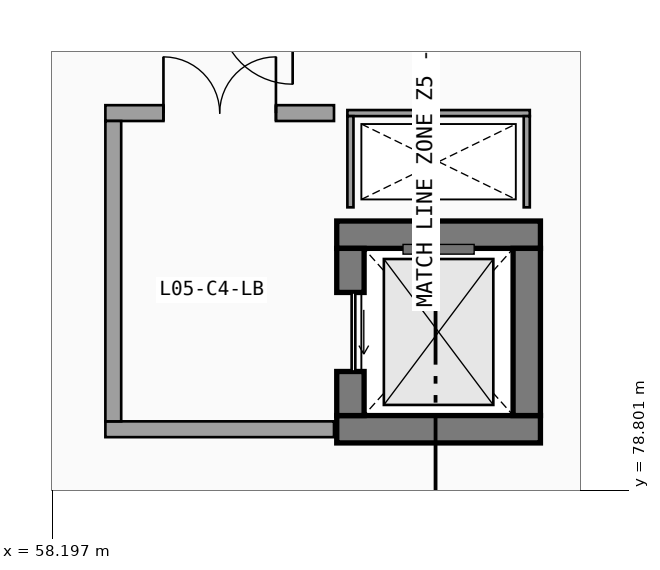
"""IFC4 building model, lengths in metres.
Left out: names, types, materials, properties, quantities, classifications, styles, units other than length and angle.
Written with IfcOpenShell. Run it as: python <this file> out.ifc"""

import sys

from ifc_helpers import new_model, si_unit, direction, frame, frame_2d, origin, place, context, subcontext, project, spatial, rectangle, extrude, element, fill, save


model = new_model("IFC4")
c1 = context("Model", 3, precision=1e-05, world=origin(), true_north=direction((0.0, 1.0)))
c2 = subcontext(c1, "Body", "Model", "MODEL_VIEW")
j1 = project(units=[si_unit("LENGTHUNIT", "METRE"), si_unit("PLANEANGLEUNIT", "RADIAN")], contexts=[c1])
p1 = place(None, origin())
s1 = spatial("IfcSite", under=j1, at=p1, CompositionType="ELEMENT")
p2 = place(p1, origin())
s2 = spatial("IfcBuilding", under=s1, at=p2, CompositionType="ELEMENT")
p3 = place(p2, frame((0.0, 0.0, 23.1)))
s3 = spatial("IfcBuildingStorey", under=s2, at=p3, CompositionType="ELEMENT", Elevation=23.1)
for number, where, z_axis, x_axis in (
    (1, (62.875, 79.8, 0.0), (0.0, 0.0, 1.0), (1.0, 0.0, 0.0)),
    (2, (66.225, 83.0, 0.0), (0.0, 0.0, 1.0), (-1.0, 0.0, 0.0)),
):
    element("IfcWall", number, at=place(p3, frame(where, z_axis=z_axis, x_axis=x_axis)), inside=s3, PredefinedType="SHEAR", context=c2, shape_type="SweptSolid", body=[
        extrude(rectangle(XDim=3.35, YDim=0.45, at=frame_2d((1.675, 0.0))), origin(), (0.0, 0.0, 1.0), 4.82),
    ])
p4 = place(p3, frame((63.1, 82.775, 0.0), z_axis=(0.0, 0.0, 1.0), x_axis=(0.0, -1.0, 0.0)))
e3 = element("IfcWall", 3, at=p4, inside=s3, PredefinedType="SHEAR", context=c2, shape_type="SweptSolid", body=[
    extrude(rectangle(XDim=2.75, YDim=0.45, at=frame_2d((1.375, 0.0))), origin(), (0.0, 0.0, 1.0), 4.82),
])
p5 = place(p4, frame((0.725, 0.0, 0.0), z_axis=(0.0, 0.0, 1.0), x_axis=(1.0, 0.0, 0.0)))
e4 = element("IfcOpeningElement", 4, at=p5, cuts=e3, PredefinedType="OPENING", context=c2, shape_type="SweptSolid", body=[
    extrude(rectangle(XDim=1.3, YDim=2.25, at=frame_2d((0.65, 1.125))), frame((0.0, 0.235, 0.0), z_axis=(0.0, -1.0, 0.0), x_axis=(1.0, 0.0, 0.0)), (0.0, 0.0, 1.0), 0.47),
])
p6 = place(p3, frame((66.0, 80.025, 0.0), z_axis=(0.0, 0.0, 1.0), x_axis=(0.0, 1.0, 0.0)))
e5 = element("IfcWall", 5, at=p6, inside=s3, PredefinedType="SHEAR", context=c2, shape_type="SweptSolid", body=[
    extrude(rectangle(XDim=2.75, YDim=0.45, at=frame_2d((1.375, 0.0))), origin(), (0.0, 0.0, 1.0), 4.82),
])
p7 = place(p3, frame((66.05, 85.0, 0.0), z_axis=(0.0, 0.0, 1.0), x_axis=(-1.0, 0.0, 0.0)))
e6 = element("IfcWall", 6, at=p7, inside=s3, PredefinedType="PARTITIONING", context=c2, shape_type="SweptSolid", body=[
    extrude(rectangle(XDim=3.0, YDim=0.1, at=frame_2d((1.5, 0.0))), origin(), (0.0, 0.0, 1.0), 4.82),
])
for number, where, z_axis, x_axis in (
    (7, (63.1, 84.95, 0.0), (0.0, 0.0, 1.0), (0.0, -1.0, 0.0)),
    (8, (66.0, 83.45, 0.0), (0.0, 0.0, 1.0), (0.0, 1.0, 0.0)),
):
    element("IfcWall", number, at=place(p3, frame(where, z_axis=z_axis, x_axis=x_axis)), inside=s3, PredefinedType="PARTITIONING", context=c2, shape_type="SweptSolid", body=[
        extrude(rectangle(XDim=1.5, YDim=0.1, at=frame_2d((0.75, 0.0))), origin(), (0.0, 0.0, 1.0), 4.82),
    ])
p8 = place(p3, frame((59.07, 79.8, 0.0), z_axis=(0.0, 0.0, 1.0), x_axis=(1.0, 0.0, 0.0)))
e9 = element("IfcWall", 9, at=p8, inside=s3, PredefinedType="SOLIDWALL", context=c2, shape_type="SweptSolid", body=[
    extrude(rectangle(XDim=3.76, YDim=0.26, at=frame_2d((1.88, 0.0))), origin(), (0.0, 0.0, 1.0), 4.82),
])
p9 = place(p3, frame((62.83, 85.0, 0.0), z_axis=(0.0, 0.0, 1.0), x_axis=(-1.0, 0.0, 0.0)))
e10 = element("IfcWall", 10, at=p9, inside=s3, PredefinedType="SOLIDWALL", context=c2, shape_type="SweptSolid", body=[
    extrude(rectangle(XDim=3.76, YDim=0.26, at=frame_2d((1.88, 0.0))), origin(), (0.0, 0.0, 1.0), 4.82),
])
p10 = place(p9, frame((2.805, 0.0, 0.0), z_axis=(0.0, 0.0, 1.0), x_axis=(-1.0, 0.0, 0.0)))
e11 = element("IfcOpeningElement", 11, at=p10, cuts=e10, PredefinedType="OPENING", context=c2, shape_type="SweptSolid", body=[
    extrude(rectangle(XDim=1.85, YDim=2.25, at=frame_2d((0.925, 1.125))), frame((0.0, 0.14, 0.0), z_axis=(0.0, -1.0, 0.0), x_axis=(1.0, 0.0, 0.0)), (0.0, 0.0, 1.0), 0.28),
])
p11 = place(p3, frame((59.2, 84.87, 0.0), z_axis=(0.0, 0.0, 1.0), x_axis=(0.0, -1.0, 0.0)))
e12 = element("IfcWall", 12, at=p11, inside=s3, PredefinedType="SOLIDWALL", context=c2, shape_type="SweptSolid", body=[
    extrude(rectangle(XDim=4.94, YDim=0.26, at=frame_2d((2.47, 0.0))), origin(), (0.0, 0.0, 1.0), 4.82),
])
p12 = place(p5, origin())
e13 = element("IfcDoor", 13, at=p12, inside=s3, OperationType="SLIDING_TO_RIGHT", PredefinedType="DOOR", context=c2, shape_type="SweptSolid", body=[
    extrude(rectangle(XDim=1.3, YDim=2.25, at=frame_2d((0.65, 1.125))), frame((0.0, 0.025, 0.0), z_axis=(0.0, -1.0, 0.0), x_axis=(1.0, 0.0, 0.0)), (0.0, 0.0, 1.0), 0.05),
])
fill(e4, e13)
p13 = place(p10, origin())
e14 = element("IfcDoor", 14, at=p13, inside=s3, OperationType="DOUBLE_DOOR_SINGLE_SWING", PredefinedType="DOOR", context=c2, shape_type="SweptSolid", body=[
    extrude(rectangle(XDim=1.85, YDim=2.25, at=frame_2d((0.925, 1.125))), frame((0.0, 0.025, 0.0), z_axis=(0.0, -1.0, 0.0), x_axis=(1.0, 0.0, 0.0)), (0.0, 0.0, 1.0), 0.05),
])
fill(e11, e14)
save(model, sys.argv[1])
